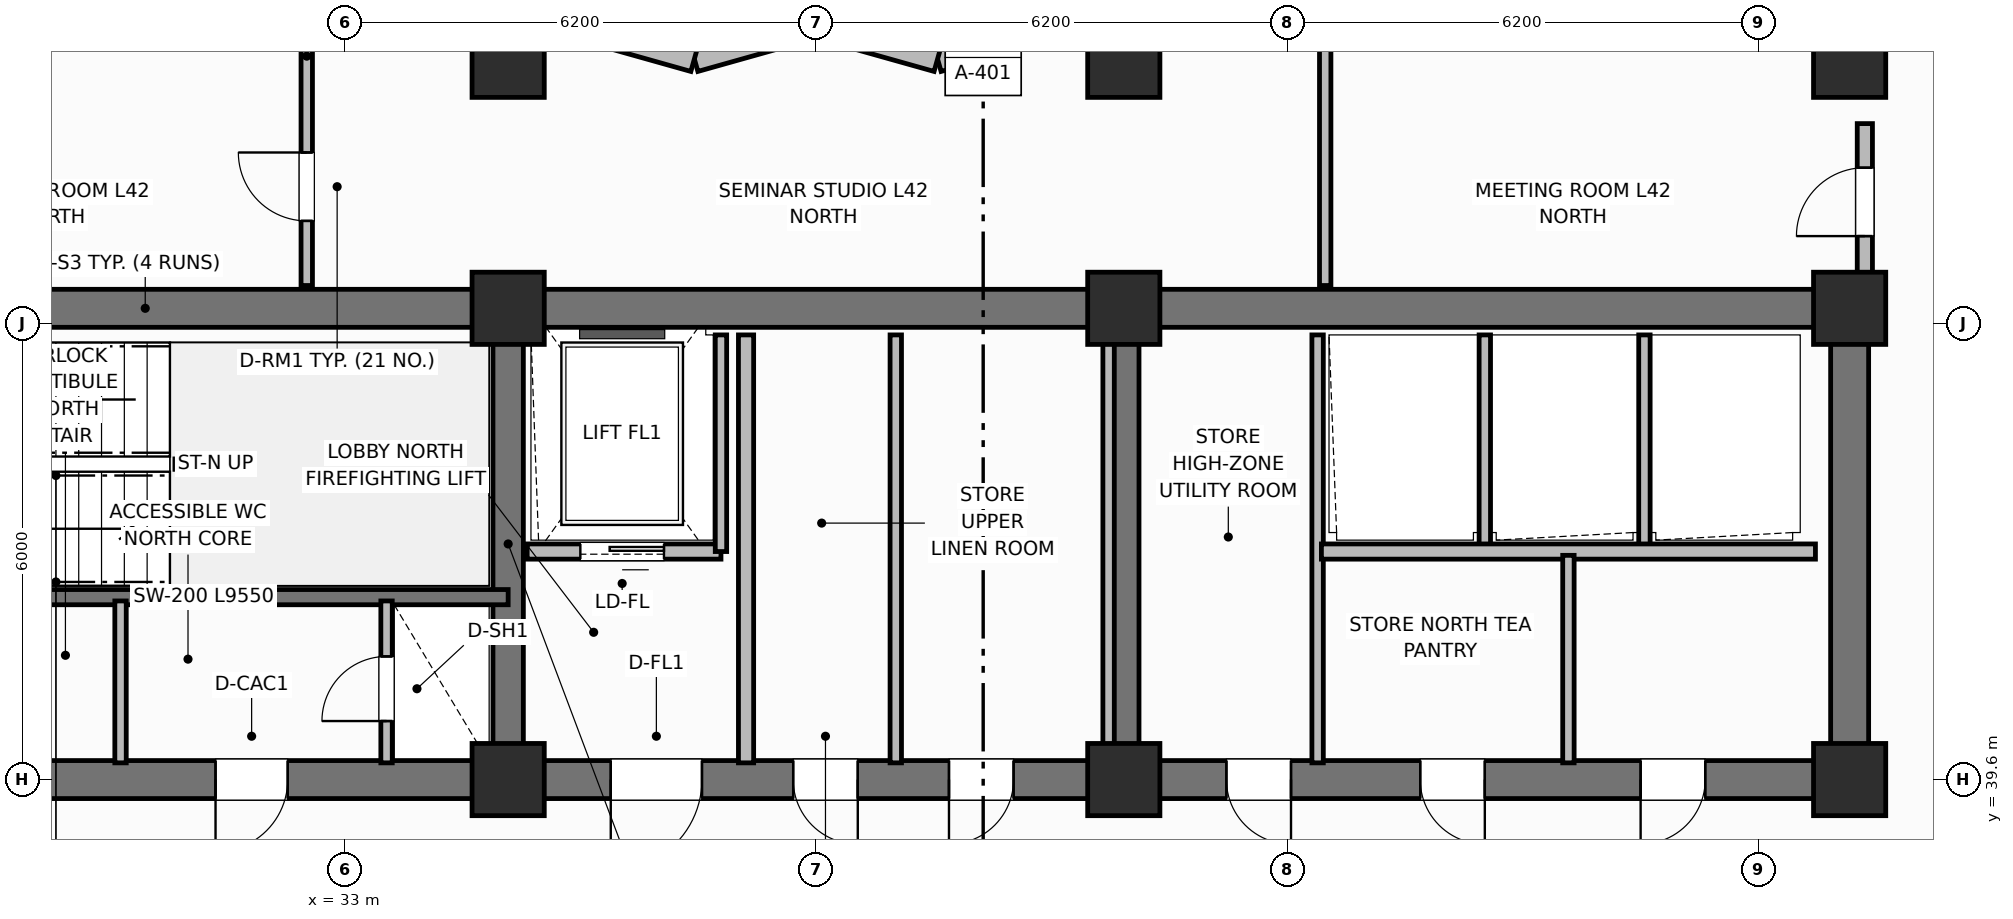
"""IFC4 building model, lengths in metres.
Left out: names, types, materials, properties, quantities, classifications, styles, units other than length and angle.
Written with IfcOpenShell. Run it as: python <this file> out.ifc"""

import sys

from ifc_helpers import new_model, si_unit, direction, frame, frame_2d, origin, origin_2d, place, context, subcontext, project, spatial, rectangle, extrude, element, fill, save


model = new_model("IFC4")
c1 = context("Model", 3, precision=1e-05, world=origin(), true_north=direction((0.0, 1.0)))
c2 = subcontext(c1, "Body", "Model", "MODEL_VIEW")
j1 = project(units=[si_unit("LENGTHUNIT", "METRE"), si_unit("PLANEANGLEUNIT", "RADIAN")], contexts=[c1])
p1 = place(None, origin())
s1 = spatial("IfcSite", under=j1, at=p1, CompositionType="ELEMENT")
p2 = place(p1, origin())
s2 = spatial("IfcBuilding", under=s1, at=p2, CompositionType="ELEMENT")
p3 = place(p2, frame((0.0, 0.0, 170.0)))
s3 = spatial("IfcBuildingStorey", under=s2, at=p3, CompositionType="ELEMENT", Elevation=170.0)
p4 = place(p3, frame((25.6, 45.8, 0.0), z_axis=(0.0, 0.0, 1.0), x_axis=(1.0, 0.0, 0.0)))
e1 = element("IfcWall", 1, at=p4, inside=s3, PredefinedType="SHEAR", context=c2, shape_type="SweptSolid", body=[
    extrude(rectangle(XDim=27.2, YDim=0.5, at=frame_2d((13.6, 0.0))), origin(), (0.0, 0.0, 1.0), 3.7),
])
p5 = place(p3, frame((52.8, 39.85, 0.0), z_axis=(0.0, 0.0, 1.0), x_axis=(0.0, 1.0, 0.0)))
e2 = element("IfcWall", 2, at=p5, inside=s3, PredefinedType="SHEAR", context=c2, shape_type="SweptSolid", body=[
    extrude(rectangle(XDim=5.7, YDim=0.5, at=frame_2d((2.85, 0.0))), origin(), (0.0, 0.0, 1.0), 3.7),
])
p6 = place(p3, frame((52.8, 39.6, 0.0), z_axis=(0.0, 0.0, 1.0), x_axis=(-1.0, 0.0, 0.0)))
e3 = element("IfcWall", 3, at=p6, inside=s3, PredefinedType="SHEAR", context=c2, shape_type="SweptSolid", body=[
    extrude(rectangle(XDim=27.2, YDim=0.5, at=frame_2d((13.6, 0.0))), origin(), (0.0, 0.0, 1.0), 3.7),
])
p7 = place(p6, frame((24.2, 0.0, 0.0)))
e4 = element("IfcOpeningElement", 4, at=p7, cuts=e3, PredefinedType="OPENING", context=c2, shape_type="SweptSolid", body=[
    extrude(rectangle(XDim=1.1, YDim=2.15, at=frame_2d((0.55, 1.075))), frame((0.0, 0.26, 0.0), z_axis=(0.0, -1.0, 0.0), x_axis=(1.0, 0.0, 0.0)), (0.0, 0.0, 1.0), 0.52),
])
p8 = place(p6, frame((20.55, 0.0, 0.0)))
e5 = element("IfcOpeningElement", 5, at=p8, cuts=e3, PredefinedType="OPENING", context=c2, shape_type="SweptSolid", body=[
    extrude(rectangle(XDim=0.95, YDim=2.1, at=frame_2d((0.475, 1.05))), frame((0.0, 0.26, 0.0), z_axis=(0.0, -1.0, 0.0), x_axis=(1.0, 0.0, 0.0)), (0.0, 0.0, 1.0), 0.52),
])
p9 = place(p6, frame((15.1, 0.0, 0.0)))
e6 = element("IfcOpeningElement", 6, at=p9, cuts=e3, PredefinedType="OPENING", context=c2, shape_type="SweptSolid", body=[
    extrude(rectangle(XDim=1.2, YDim=2.15, at=frame_2d((0.6, 1.075))), frame((0.0, 0.26, 0.0), z_axis=(0.0, -1.0, 0.0), x_axis=(1.0, 0.0, 0.0)), (0.0, 0.0, 1.0), 0.52),
])
p10 = place(p6, frame((13.05, 0.0, 0.0)))
e7 = element("IfcOpeningElement", 7, at=p10, cuts=e3, PredefinedType="OPENING", context=c2, shape_type="SweptSolid", body=[
    extrude(rectangle(XDim=0.85, YDim=2.1, at=frame_2d((0.425, 1.05))), frame((0.0, 0.26, 0.0), z_axis=(0.0, -1.0, 0.0), x_axis=(1.0, 0.0, 0.0)), (0.0, 0.0, 1.0), 0.52),
])
p11 = place(p6, frame((11.0, 0.0, 0.0)))
e8 = element("IfcOpeningElement", 8, at=p11, cuts=e3, PredefinedType="OPENING", context=c2, shape_type="SweptSolid", body=[
    extrude(rectangle(XDim=0.85, YDim=2.1, at=frame_2d((0.425, 1.05))), frame((0.0, 0.26, 0.0), z_axis=(0.0, -1.0, 0.0), x_axis=(1.0, 0.0, 0.0)), (0.0, 0.0, 1.0), 0.52),
])
p12 = place(p6, frame((7.35, 0.0, 0.0)))
e9 = element("IfcOpeningElement", 9, at=p12, cuts=e3, PredefinedType="OPENING", context=c2, shape_type="SweptSolid", body=[
    extrude(rectangle(XDim=0.85, YDim=2.1, at=frame_2d((0.425, 1.05))), frame((0.0, 0.26, 0.0), z_axis=(0.0, -1.0, 0.0), x_axis=(1.0, 0.0, 0.0)), (0.0, 0.0, 1.0), 0.52),
])
p13 = place(p6, frame((4.8, 0.0, 0.0)))
e10 = element("IfcOpeningElement", 10, at=p13, cuts=e3, PredefinedType="OPENING", context=c2, shape_type="SweptSolid", body=[
    extrude(rectangle(XDim=0.85, YDim=2.1, at=frame_2d((0.425, 1.05))), frame((0.0, 0.26, 0.0), z_axis=(0.0, -1.0, 0.0), x_axis=(1.0, 0.0, 0.0)), (0.0, 0.0, 1.0), 0.52),
])
p14 = place(p6, frame((1.9, 0.0, 0.0)))
e11 = element("IfcOpeningElement", 11, at=p14, cuts=e3, PredefinedType="OPENING", context=c2, shape_type="SweptSolid", body=[
    extrude(rectangle(XDim=0.85, YDim=2.1, at=frame_2d((0.425, 1.05))), frame((0.0, 0.26, 0.0), z_axis=(0.0, -1.0, 0.0), x_axis=(1.0, 0.0, 0.0)), (0.0, 0.0, 1.0), 0.52),
])
for number, where, z_axis, x_axis in (
    (12, (35.15, 39.85, 0.0), (0.0, 0.0, 1.0), (0.0, 1.0, 0.0)),
    (13, (43.25, 39.85, 0.0), (0.0, 0.0, 1.0), (0.0, 1.0, 0.0)),
):
    element("IfcWall", number, at=place(p3, frame(where, z_axis=z_axis, x_axis=x_axis)), inside=s3, PredefinedType="SHEAR", context=c2, shape_type="SweptSolid", body=[
        extrude(rectangle(XDim=5.7, YDim=0.4, at=frame_2d((2.85, 0.0))), origin(), (0.0, 0.0, 1.0), 3.7),
    ])
for number, where, z_axis, x_axis in (
    (14, (35.15, 39.6, 0.0), (0.0, 0.0, 1.0), (1.0, 0.0, 0.0)),
    (15, (35.15, 45.8, 0.0), (0.0, 0.0, 1.0), (1.0, 0.0, 0.0)),
    (16, (43.25, 39.6, 0.0), (0.0, 0.0, 1.0), (1.0, 0.0, 0.0)),
    (17, (43.25, 45.8, 0.0), (0.0, 0.0, 1.0), (1.0, 0.0, 0.0)),
    (18, (52.8, 39.6, 0.0), (0.0, 0.0, 1.0), (1.0, 0.0, 0.0)),
    (19, (52.8, 45.8, 0.0), (0.0, 0.0, 1.0), (1.0, 0.0, 0.0)),
    (20, (35.15, 49.05, 0.0), (0.0, 0.0, 1.0), (1.0, 0.0, 0.0)),
    (21, (43.25, 49.05, 0.0), (0.0, 0.0, 1.0), (1.0, 0.0, 0.0)),
    (22, (52.8, 49.05, 0.0), (0.0, 0.0, 1.0), (1.0, 0.0, 0.0)),
):
    element("IfcColumn", number, at=place(p3, frame(where, z_axis=z_axis, x_axis=x_axis)), inside=s3, PredefinedType="COLUMN", context=c2, shape_type="SweptSolid", body=[
        extrude(rectangle(XDim=0.95, YDim=0.95, at=origin_2d()), origin(), (0.0, 0.0, 1.0), 3.7),
    ])
p15 = place(p3, frame((42.4, 49.53, 0.0), z_axis=(0.0, 0.0, 1.0), x_axis=(-0.962652136636, -0.270741322725, 0.0)))
e23 = element("IfcWall", 23, at=p15, inside=s3, PredefinedType="SOLIDWALL", context=c2, shape_type="SweptSolid", body=[
    extrude(rectangle(XDim=1.662, YDim=0.34, at=frame_2d((0.831, 0.0))), origin(), (0.0, 0.0, 1.0), 2.72),
])
p16 = place(p3, frame((40.8, 49.08, 0.0), z_axis=(0.0, 0.0, 1.0), x_axis=(-0.962662902433, 0.270703040766, 0.0)))
e24 = element("IfcWall", 24, at=p16, inside=s3, PredefinedType="SOLIDWALL", context=c2, shape_type="SweptSolid", body=[
    extrude(rectangle(XDim=1.662, YDim=0.34, at=frame_2d((0.831, 0.0))), origin(), (0.0, 0.0, 1.0), 2.72),
])
p17 = place(p3, frame((39.2, 49.53, 0.0), z_axis=(0.0, 0.0, 1.0), x_axis=(-0.962652136636, -0.270741322725, 0.0)))
e25 = element("IfcWall", 25, at=p17, inside=s3, PredefinedType="SOLIDWALL", context=c2, shape_type="SweptSolid", body=[
    extrude(rectangle(XDim=1.662, YDim=0.34, at=frame_2d((0.831, 0.0))), origin(), (0.0, 0.0, 1.0), 2.72),
])
p18 = place(p3, frame((37.6, 49.08, 0.0), z_axis=(0.0, 0.0, 1.0), x_axis=(-0.962662902433, 0.270703040766, 0.0)))
e26 = element("IfcWall", 26, at=p18, inside=s3, PredefinedType="SOLIDWALL", context=c2, shape_type="SweptSolid", body=[
    extrude(rectangle(XDim=1.662, YDim=0.34, at=frame_2d((0.831, 0.0))), origin(), (0.0, 0.0, 1.0), 2.72),
])
p19 = place(p3, frame((35.15, 42.0, 0.0), z_axis=(0.0, 0.0, 1.0), x_axis=(-1.0, 0.0, 0.0)))
e27 = element("IfcWall", 27, at=p19, inside=s3, PredefinedType="SHEAR", context=c2, shape_type="SweptSolid", body=[
    extrude(rectangle(XDim=9.55, YDim=0.2, at=frame_2d((4.775, 0.0))), origin(), (0.0, 0.0, 1.0), 3.7),
])
p20 = place(p19, frame((7.25, 0.0, 0.0)))
e28 = element("IfcOpeningElement", 28, at=p20, cuts=e27, PredefinedType="OPENING", context=c2, shape_type="SweptSolid", body=[
    extrude(rectangle(XDim=1.1, YDim=2.15, at=frame_2d((0.55, 1.075))), frame((0.0, 0.11, 0.0), z_axis=(0.0, -1.0, 0.0), x_axis=(1.0, 0.0, 0.0)), (0.0, 0.0, 1.0), 0.22),
])
p21 = place(p3, frame((33.55, 39.82, 0.0), z_axis=(0.0, 0.0, 1.0), x_axis=(0.0, 1.0, 0.0)))
e29 = element("IfcWall", 29, at=p21, inside=s3, PredefinedType="PARTITIONING", context=c2, shape_type="SweptSolid", body=[
    extrude(rectangle(XDim=2.13, YDim=0.15, at=frame_2d((1.065, 0.0))), origin(), (0.0, 0.0, 1.0), 2.55),
])
p22 = place(p21, frame((0.55, 0.0, 0.0)))
e30 = element("IfcOpeningElement", 30, at=p22, cuts=e29, PredefinedType="OPENING", context=c2, shape_type="SweptSolid", body=[
    extrude(rectangle(XDim=0.85, YDim=2.05, at=frame_2d((0.425, 1.025))), frame((0.0, 0.085, 0.0), z_axis=(0.0, -1.0, 0.0), x_axis=(1.0, 0.0, 0.0)), (0.0, 0.0, 1.0), 0.17),
])
p23 = place(p3, frame((30.05, 39.82, 0.0), z_axis=(0.0, 0.0, 1.0), x_axis=(0.0, 1.0, 0.0)))
e31 = element("IfcWall", 31, at=p23, inside=s3, PredefinedType="PARTITIONING", context=c2, shape_type="SweptSolid", body=[
    extrude(rectangle(XDim=2.13, YDim=0.15, at=frame_2d((1.065, 0.0))), origin(), (0.0, 0.0, 1.0), 2.55),
])
p24 = place(p3, frame((37.95, 42.6, 0.0), z_axis=(0.0, 0.0, 1.0), x_axis=(-1.0, 0.0, 0.0)))
e32 = element("IfcWall", 32, at=p24, inside=s3, PredefinedType="PARTITIONING", context=c2, shape_type="SweptSolid", body=[
    extrude(rectangle(XDim=2.55, YDim=0.2, at=frame_2d((1.275, 0.0))), origin(), (0.0, 0.0, 1.0), 2.32),
])
p25 = place(p24, frame((0.75, 0.0, 0.0)))
e33 = element("IfcOpeningElement", 33, at=p25, cuts=e32, PredefinedType="OPENING", context=c2, shape_type="SweptSolid", body=[
    extrude(rectangle(XDim=1.1, YDim=2.15, at=frame_2d((0.55, 1.075))), frame((0.0, 0.11, 0.0), z_axis=(0.0, -1.0, 0.0), x_axis=(1.0, 0.0, 0.0)), (0.0, 0.0, 1.0), 0.22),
])
p26 = place(p3, frame((37.95, 42.6, 0.0), z_axis=(0.0, 0.0, 1.0), x_axis=(0.0, 1.0, 0.0)))
e34 = element("IfcWall", 34, at=p26, inside=s3, PredefinedType="PARTITIONING", context=c2, shape_type="SweptSolid", body=[
    extrude(rectangle(XDim=2.85, YDim=0.15, at=frame_2d((1.425, 0.0))), origin(), (0.0, 0.0, 1.0), 2.55),
])
p27 = place(p3, frame((38.28, 39.82, 0.0), z_axis=(0.0, 0.0, 1.0), x_axis=(0.0, 1.0, 0.0)))
e35 = element("IfcWall", 35, at=p27, inside=s3, PredefinedType="PARTITIONING", context=c2, shape_type="SweptSolid", body=[
    extrude(rectangle(XDim=5.63, YDim=0.2, at=frame_2d((2.815, 0.0))), origin(), (0.0, 0.0, 1.0), 2.55),
])
for number, where, z_axis, x_axis in (
    (36, (43.05, 39.82, 0.0), (0.0, 0.0, 1.0), (0.0, 1.0, 0.0)),
    (37, (40.25, 39.82, 0.0), (0.0, 0.0, 1.0), (0.0, 1.0, 0.0)),
    (38, (45.8, 39.82, 0.0), (0.0, 0.0, 1.0), (0.0, 1.0, 0.0)),
):
    element("IfcWall", number, at=place(p3, frame(where, z_axis=z_axis, x_axis=x_axis)), inside=s3, PredefinedType="PARTITIONING", context=c2, shape_type="SweptSolid", body=[
        extrude(rectangle(XDim=5.63, YDim=0.15, at=frame_2d((2.815, 0.0))), origin(), (0.0, 0.0, 1.0), 2.55),
    ])
for number, where, z_axis, x_axis in (
    (39, (48.0, 42.65, 0.0), (0.0, 0.0, 1.0), (0.0, 1.0, 0.0)),
    (40, (50.1, 42.65, 0.0), (0.0, 0.0, 1.0), (0.0, 1.0, 0.0)),
):
    element("IfcWall", number, at=place(p3, frame(where, z_axis=z_axis, x_axis=x_axis)), inside=s3, PredefinedType="PARTITIONING", context=c2, shape_type="SweptSolid", body=[
        extrude(rectangle(XDim=2.8, YDim=0.15, at=frame_2d((1.4, 0.0))), origin(), (0.0, 0.0, 1.0), 2.55),
    ])
p28 = place(p3, frame((52.35, 42.6, 0.0), z_axis=(0.0, 0.0, 1.0), x_axis=(-1.0, 0.0, 0.0)))
e41 = element("IfcWall", 41, at=p28, inside=s3, PredefinedType="PARTITIONING", context=c2, shape_type="SweptSolid", body=[
    extrude(rectangle(XDim=6.5, YDim=0.2, at=frame_2d((3.25, 0.0))), origin(), (0.0, 0.0, 1.0), 2.55),
])
p29 = place(p3, frame((49.1, 39.82, 0.0), z_axis=(0.0, 0.0, 1.0), x_axis=(0.0, 1.0, 0.0)))
e42 = element("IfcWall", 42, at=p29, inside=s3, PredefinedType="PARTITIONING", context=c2, shape_type="SweptSolid", body=[
    extrude(rectangle(XDim=2.73, YDim=0.15, at=frame_2d((1.365, 0.0))), origin(), (0.0, 0.0, 1.0), 2.55),
])
p30 = place(p3, frame((32.5, 46.1, 0.0), z_axis=(0.0, 0.0, 1.0), x_axis=(0.0, 1.0, 0.0)))
e43 = element("IfcWall", 43, at=p30, inside=s3, PredefinedType="PARTITIONING", context=c2, shape_type="SweptSolid", body=[
    extrude(rectangle(XDim=3.43, YDim=0.15, at=frame_2d((1.715, 0.0))), origin(), (0.0, 0.0, 1.0), 2.55),
])
p31 = place(p30, frame((0.85, 0.0, 0.0)))
e44 = element("IfcOpeningElement", 44, at=p31, cuts=e43, PredefinedType="OPENING", context=c2, shape_type="SweptSolid", body=[
    extrude(rectangle(XDim=0.9, YDim=2.1, at=frame_2d((0.45, 1.05))), frame((0.0, 0.085, 0.0), z_axis=(0.0, -1.0, 0.0), x_axis=(1.0, 0.0, 0.0)), (0.0, 0.0, 1.0), 0.17),
])
p32 = place(p3, frame((45.9, 46.1, 0.0), z_axis=(0.0, 0.0, 1.0), x_axis=(0.0, 1.0, 0.0)))
e45 = element("IfcWall", 45, at=p32, inside=s3, PredefinedType="PARTITIONING", context=c2, shape_type="SweptSolid", body=[
    extrude(rectangle(XDim=3.43, YDim=0.15, at=frame_2d((1.715, 0.0))), origin(), (0.0, 0.0, 1.0), 2.55),
])
p33 = place(p3, frame((53.0, 46.1, 0.0), z_axis=(0.0, 0.0, 1.0), x_axis=(0.0, 1.0, 0.0)))
e46 = element("IfcWall", 46, at=p33, inside=s3, PredefinedType="PARTITIONING", context=c2, shape_type="SweptSolid", body=[
    extrude(rectangle(XDim=2.13, YDim=0.2, at=frame_2d((1.065, 0.0))), origin(), (0.0, 0.0, 1.0), 2.55),
])
p34 = place(p33, frame((0.65, 0.0, 0.0)))
e47 = element("IfcOpeningElement", 47, at=p34, cuts=e46, PredefinedType="OPENING", context=c2, shape_type="SweptSolid", body=[
    extrude(rectangle(XDim=0.9, YDim=2.1, at=frame_2d((0.45, 1.05))), frame((0.0, 0.11, 0.0), z_axis=(0.0, -1.0, 0.0), x_axis=(1.0, 0.0, 0.0)), (0.0, 0.0, 1.0), 0.22),
])
p35 = place(p22, origin())
e48 = element("IfcDoor", 48, at=p35, inside=s3, OperationType="SINGLE_SWING_LEFT", PredefinedType="TRAPDOOR", context=c2, shape_type="SweptSolid", body=[
    extrude(rectangle(XDim=0.85, YDim=2.05, at=frame_2d((0.425, 1.025))), frame((0.0, 0.025, 0.0), z_axis=(0.0, -1.0, 0.0), x_axis=(1.0, 0.0, 0.0)), (0.0, 0.0, 1.0), 0.05),
])
fill(e30, e48)
p36 = place(p25, origin())
e49 = element("IfcDoor", 49, at=p36, inside=s3, OperationType="SLIDING_TO_LEFT", PredefinedType="DOOR", context=c2, shape_type="SweptSolid", body=[
    extrude(rectangle(XDim=1.1, YDim=2.15, at=frame_2d((0.55, 1.075))), frame((0.0, 0.025, 0.0), z_axis=(0.0, -1.0, 0.0), x_axis=(1.0, 0.0, 0.0)), (0.0, 0.0, 1.0), 0.05),
])
fill(e33, e49)
p37 = place(p31, origin())
e50 = element("IfcDoor", 50, at=p37, inside=s3, OperationType="SINGLE_SWING_RIGHT", PredefinedType="DOOR", context=c2, shape_type="SweptSolid", body=[
    extrude(rectangle(XDim=0.9, YDim=2.1, at=frame_2d((0.45, 1.05))), frame((0.0, 0.025, 0.0), z_axis=(0.0, -1.0, 0.0), x_axis=(1.0, 0.0, 0.0)), (0.0, 0.0, 1.0), 0.05),
])
fill(e44, e50)
p38 = place(p34, origin())
e51 = element("IfcDoor", 51, at=p38, inside=s3, OperationType="SINGLE_SWING_LEFT", PredefinedType="DOOR", context=c2, shape_type="SweptSolid", body=[
    extrude(rectangle(XDim=0.9, YDim=2.1, at=frame_2d((0.45, 1.05))), frame((0.0, 0.025, 0.0), z_axis=(0.0, -1.0, 0.0), x_axis=(1.0, 0.0, 0.0)), (0.0, 0.0, 1.0), 0.05),
])
fill(e47, e51)
p39 = place(p8, origin())
e52 = element("IfcDoor", 52, at=p39, inside=s3, OperationType="SINGLE_SWING_RIGHT", PredefinedType="DOOR", context=c2, shape_type="SweptSolid", body=[
    extrude(rectangle(XDim=0.95, YDim=2.1, at=frame_2d((0.475, 1.05))), frame((0.0, 0.025, 0.0), z_axis=(0.0, -1.0, 0.0), x_axis=(1.0, 0.0, 0.0)), (0.0, 0.0, 1.0), 0.05),
])
fill(e5, e52)
p40 = place(p9, origin())
e53 = element("IfcDoor", 53, at=p40, inside=s3, OperationType="SINGLE_SWING_RIGHT", PredefinedType="DOOR", context=c2, shape_type="SweptSolid", body=[
    extrude(rectangle(XDim=1.2, YDim=2.15, at=frame_2d((0.6, 1.075))), frame((0.0, 0.025, 0.0), z_axis=(0.0, -1.0, 0.0), x_axis=(1.0, 0.0, 0.0)), (0.0, 0.0, 1.0), 0.05),
])
fill(e6, e53)
p41 = place(p10, origin())
e54 = element("IfcDoor", 54, at=p41, inside=s3, OperationType="SINGLE_SWING_LEFT", PredefinedType="DOOR", context=c2, shape_type="SweptSolid", body=[
    extrude(rectangle(XDim=0.85, YDim=2.1, at=frame_2d((0.425, 1.05))), frame((0.0, 0.025, 0.0), z_axis=(0.0, -1.0, 0.0), x_axis=(1.0, 0.0, 0.0)), (0.0, 0.0, 1.0), 0.05),
])
fill(e7, e54)
p42 = place(p11, origin())
e55 = element("IfcDoor", 55, at=p42, inside=s3, OperationType="SINGLE_SWING_RIGHT", PredefinedType="DOOR", context=c2, shape_type="SweptSolid", body=[
    extrude(rectangle(XDim=0.85, YDim=2.1, at=frame_2d((0.425, 1.05))), frame((0.0, 0.025, 0.0), z_axis=(0.0, -1.0, 0.0), x_axis=(1.0, 0.0, 0.0)), (0.0, 0.0, 1.0), 0.05),
])
fill(e8, e55)
p43 = place(p12, origin())
e56 = element("IfcDoor", 56, at=p43, inside=s3, OperationType="SINGLE_SWING_LEFT", PredefinedType="DOOR", context=c2, shape_type="SweptSolid", body=[
    extrude(rectangle(XDim=0.85, YDim=2.1, at=frame_2d((0.425, 1.05))), frame((0.0, 0.025, 0.0), z_axis=(0.0, -1.0, 0.0), x_axis=(1.0, 0.0, 0.0)), (0.0, 0.0, 1.0), 0.05),
])
fill(e9, e56)
p44 = place(p13, origin())
e57 = element("IfcDoor", 57, at=p44, inside=s3, OperationType="SINGLE_SWING_LEFT", PredefinedType="DOOR", context=c2, shape_type="SweptSolid", body=[
    extrude(rectangle(XDim=0.85, YDim=2.1, at=frame_2d((0.425, 1.05))), frame((0.0, 0.025, 0.0), z_axis=(0.0, -1.0, 0.0), x_axis=(1.0, 0.0, 0.0)), (0.0, 0.0, 1.0), 0.05),
])
fill(e10, e57)
p45 = place(p14, origin())
e58 = element("IfcDoor", 58, at=p45, inside=s3, OperationType="SINGLE_SWING_RIGHT", PredefinedType="DOOR", context=c2, shape_type="SweptSolid", body=[
    extrude(rectangle(XDim=0.85, YDim=2.1, at=frame_2d((0.425, 1.05))), frame((0.0, 0.025, 0.0), z_axis=(0.0, -1.0, 0.0), x_axis=(1.0, 0.0, 0.0)), (0.0, 0.0, 1.0), 0.05),
])
fill(e11, e58)
save(model, sys.argv[1])
